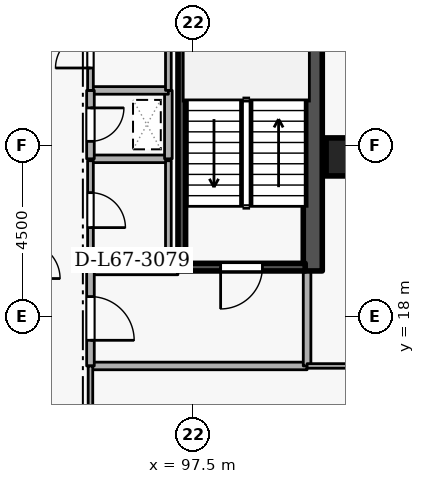
"""IFC4 building model, lengths in metres.
Left out: names, types, materials, properties, quantities, classifications, styles, units other than length and angle.
Written with IfcOpenShell. Run it as: python <this file> out.ifc"""

import sys

from ifc_helpers import new_model, si_unit, direction, frame, frame_2d, origin, origin_2d, place, context, subcontext, project, spatial, rectangle, extrude, element, fill, save


model = new_model("IFC4")
c1 = context("Model", 3, precision=1e-05, world=origin(), true_north=direction((0.0, 1.0)))
c2 = subcontext(c1, "Body", "Model", "MODEL_VIEW")
j1 = project(units=[si_unit("LENGTHUNIT", "METRE"), si_unit("PLANEANGLEUNIT", "RADIAN")], contexts=[c1])
p1 = place(None, origin())
s1 = spatial("IfcSite", under=j1, at=p1, CompositionType="ELEMENT")
p2 = place(p1, origin())
s2 = spatial("IfcBuilding", under=s1, at=p2, CompositionType="ELEMENT")
p3 = place(p2, frame((0.0, 0.0, 251.1)))
s3 = spatial("IfcBuildingStorey", under=s2, at=p3, CompositionType="ELEMENT", Elevation=251.1)
p4 = place(p3, frame((100.65, 19.2, 0.0), z_axis=(0.0, 0.0, 1.0), x_axis=(0.0, 1.0, 0.0)))
e1 = element("IfcWall", 1, at=p4, inside=s3, PredefinedType="SHEAR", context=c2, shape_type="SweptSolid", body=[
    extrude(rectangle(XDim=15.6, YDim=0.5, at=frame_2d((7.8, 0.0))), origin(), (0.0, 0.0, 1.0), 3.6),
])
p5 = place(p3, frame((101.5, 22.2, 0.0), z_axis=(0.0, 0.0, 1.0), x_axis=(1.0, 0.0, 0.0)))
e2 = element("IfcColumn", 2, at=p5, inside=s3, PredefinedType="COLUMN", context=c2, shape_type="SweptSolid", body=[
    extrude(rectangle(XDim=1.0, YDim=1.0, at=origin_2d()), origin(), (0.0, 0.0, 1.0), 3.6),
])
p6 = place(p3, frame((100.45, 19.3, 0.0), z_axis=(0.0, 0.0, 1.0), x_axis=(-1.0, 0.0, 0.0)))
e3 = element("IfcWall", 3, at=p6, inside=s3, PredefinedType="SHEAR", context=c2, shape_type="SweptSolid", body=[
    extrude(rectangle(XDim=3.35, YDim=0.2, at=frame_2d((1.675, 0.0))), origin(), (0.0, 0.0, 1.0), 3.6),
])
p7 = place(p6, frame((1.125, 0.0, 0.0)))
e4 = element("IfcOpeningElement", 4, at=p7, cuts=e3, PredefinedType="OPENING", context=c2, shape_type="SweptSolid", body=[
    extrude(rectangle(XDim=1.1, YDim=2.1, at=frame_2d((0.55, 1.05))), frame((0.0, 0.11, 0.0), z_axis=(0.0, -1.0, 0.0), x_axis=(1.0, 0.0, 0.0)), (0.0, 0.0, 1.0), 0.22),
])
p8 = place(p3, frame((97.203, 26.55, 0.0), z_axis=(0.0, 0.0, 1.0), x_axis=(0.0, -1.0, 0.0)))
e5 = element("IfcWall", 5, at=p8, inside=s3, PredefinedType="SHEAR", context=c2, shape_type="SweptSolid", body=[
    extrude(rectangle(XDim=7.1, YDim=0.2, at=frame_2d((3.55, 0.0))), origin(), (0.0, 0.0, 1.0), 3.6),
])
p9 = place(p3, frame((94.8, 16.7, 0.0), z_axis=(0.0, 0.0, 1.0), x_axis=(1.0, 0.0, 0.0)))
e6 = element("IfcWall", 6, at=p9, inside=s3, PredefinedType="STANDARD", context=c2, shape_type="SweptSolid", body=[
    extrude(rectangle(XDim=5.7, YDim=0.2, at=frame_2d((2.85, 0.0))), origin(), (0.0, 0.0, 1.0), 3.32),
])
p10 = place(p3, frame((100.5, 16.7, 0.0), z_axis=(0.0, 0.0, 1.0), x_axis=(0.0, 1.0, 0.0)))
e7 = element("IfcWall", 7, at=p10, inside=s3, PredefinedType="STANDARD", context=c2, shape_type="SweptSolid", body=[
    extrude(rectangle(XDim=2.5, YDim=0.2, at=frame_2d((1.25, 0.0))), origin(), (0.0, 0.0, 1.0), 3.32),
])
p11 = place(p3, frame((97.1, 19.2, 0.0), z_axis=(0.0, 0.0, 1.0), x_axis=(-1.0, 0.0, 0.0)))
e8 = element("IfcWall", 8, at=p11, inside=s3, PredefinedType="STANDARD", context=c2, shape_type="SweptSolid", body=[
    extrude(rectangle(XDim=2.3, YDim=0.2, at=frame_2d((1.15, 0.0))), origin(), (0.0, 0.0, 1.0), 2.525),
])
p12 = place(p3, frame((94.8, 19.2, 0.0), z_axis=(0.0, 0.0, 1.0), x_axis=(0.0, -1.0, 0.0)))
e9 = element("IfcWall", 9, at=p12, inside=s3, PredefinedType="STANDARD", context=c2, shape_type="SweptSolid", body=[
    extrude(rectangle(XDim=2.5, YDim=0.2, at=frame_2d((1.25, 0.0))), origin(), (0.0, 0.0, 1.0), 3.32),
])
p13 = place(p12, frame((0.675, 0.0, 0.0)))
e10 = element("IfcOpeningElement", 10, at=p13, cuts=e9, PredefinedType="OPENING", context=c2, shape_type="SweptSolid", body=[
    extrude(rectangle(XDim=1.15, YDim=2.1, at=frame_2d((0.575, 1.05))), frame((0.0, 0.11, 0.0), z_axis=(0.0, -1.0, 0.0), x_axis=(1.0, 0.0, 0.0)), (0.0, 0.0, 1.0), 0.22),
])
p14 = place(p3, frame((94.8, 22.15, 0.0), z_axis=(0.0, 0.0, 1.0), x_axis=(1.0, 0.0, 0.0)))
e11 = element("IfcWall", 11, at=p14, inside=s3, PredefinedType="STANDARD", context=c2, shape_type="SweptSolid", body=[
    extrude(rectangle(XDim=2.05, YDim=0.2, at=frame_2d((1.025, 0.0))), origin(), (0.0, 0.0, 1.0), 3.32),
])
p15 = place(p3, frame((96.85, 22.15, 0.0), z_axis=(0.0, 0.0, 1.0), x_axis=(0.0, 1.0, 0.0)))
e12 = element("IfcWall", 12, at=p15, inside=s3, PredefinedType="STANDARD", context=c2, shape_type="SweptSolid", body=[
    extrude(rectangle(XDim=1.8, YDim=0.2, at=frame_2d((0.9, 0.0))), origin(), (0.0, 0.0, 1.0), 3.32),
])
p16 = place(p3, frame((96.85, 23.95, 0.0), z_axis=(0.0, 0.0, 1.0), x_axis=(-1.0, 0.0, 0.0)))
e13 = element("IfcWall", 13, at=p16, inside=s3, PredefinedType="STANDARD", context=c2, shape_type="SweptSolid", body=[
    extrude(rectangle(XDim=2.05, YDim=0.2, at=frame_2d((1.025, 0.0))), origin(), (0.0, 0.0, 1.0), 3.32),
])
p17 = place(p3, frame((94.8, 23.95, 0.0), z_axis=(0.0, 0.0, 1.0), x_axis=(0.0, -1.0, 0.0)))
e14 = element("IfcWall", 14, at=p17, inside=s3, PredefinedType="STANDARD", context=c2, shape_type="SweptSolid", body=[
    extrude(rectangle(XDim=1.8, YDim=0.2, at=frame_2d((0.9, 0.0))), origin(), (0.0, 0.0, 1.0), 3.32),
])
p18 = place(p17, frame((0.46, 0.0, 0.0)))
e15 = element("IfcOpeningElement", 15, at=p18, cuts=e14, PredefinedType="OPENING", context=c2, shape_type="SweptSolid", body=[
    extrude(rectangle(XDim=0.88, YDim=2.04, at=frame_2d((0.44, 1.02))), frame((0.0, 0.11, 0.0), z_axis=(0.0, -1.0, 0.0), x_axis=(1.0, 0.0, 0.0)), (0.0, 0.0, 1.0), 0.22),
])
p19 = place(p3, frame((94.8, 19.5, 0.0), z_axis=(0.0, 0.0, 1.0), x_axis=(1.0, 0.0, 0.0)))
e16 = element("IfcWall", 16, at=p19, inside=s3, PredefinedType="PARTITIONING", context=c2, shape_type="SweptSolid", body=[
    extrude(rectangle(XDim=2.05, YDim=0.15, at=frame_2d((1.025, 0.0))), origin(), (0.0, 0.0, 1.0), 2.525),
])
p20 = place(p3, frame((96.85, 19.5, 0.0), z_axis=(0.0, 0.0, 1.0), x_axis=(0.0, 1.0, 0.0)))
e17 = element("IfcWall", 17, at=p20, inside=s3, PredefinedType="PARTITIONING", context=c2, shape_type="SweptSolid", body=[
    extrude(rectangle(XDim=2.6, YDim=0.15, at=frame_2d((1.3, 0.0))), origin(), (0.0, 0.0, 1.0), 3.32),
])
p21 = place(p3, frame((94.8, 22.1, 0.0), z_axis=(0.0, 0.0, 1.0), x_axis=(0.0, -1.0, 0.0)))
e18 = element("IfcWall", 18, at=p21, inside=s3, PredefinedType="PARTITIONING", context=c2, shape_type="SweptSolid", body=[
    extrude(rectangle(XDim=2.6, YDim=0.15, at=frame_2d((1.3, 0.0))), origin(), (0.0, 0.0, 1.0), 3.32),
])
p22 = place(p21, frame((0.84, 0.0, 0.0)))
e19 = element("IfcOpeningElement", 19, at=p22, cuts=e18, PredefinedType="OPENING", context=c2, shape_type="SweptSolid", body=[
    extrude(rectangle(XDim=0.92, YDim=2.08, at=frame_2d((0.46, 1.04))), frame((0.0, 0.085, 0.0), z_axis=(0.0, -1.0, 0.0), x_axis=(1.0, 0.0, 0.0)), (0.0, 0.0, 1.0), 0.17),
])
p23 = place(p3, frame((94.8, 23.95, 0.0), z_axis=(0.0, 0.0, 1.0), x_axis=(0.0, 1.0, 0.0)))
e20 = element("IfcWall", 20, at=p23, inside=s3, PredefinedType="PARTITIONING", context=c2, shape_type="SweptSolid", body=[
    extrude(rectangle(XDim=2.1, YDim=0.15, at=frame_2d((1.05, 0.0))), origin(), (0.0, 0.0, 1.0), 3.32),
])
p24 = place(p23, frame((0.59, 0.0, 0.0)))
e21 = element("IfcOpeningElement", 21, at=p24, cuts=e20, PredefinedType="OPENING", context=c2, shape_type="SweptSolid", body=[
    extrude(rectangle(XDim=0.92, YDim=2.08, at=frame_2d((0.46, 1.04))), frame((0.0, 0.085, 0.0), z_axis=(0.0, -1.0, 0.0), x_axis=(1.0, 0.0, 0.0)), (0.0, 0.0, 1.0), 0.17),
])
p25 = place(p3, frame((96.85, 26.05, 0.0), z_axis=(0.0, 0.0, 1.0), x_axis=(0.0, -1.0, 0.0)))
e22 = element("IfcWall", 22, at=p25, inside=s3, PredefinedType="PARTITIONING", context=c2, shape_type="SweptSolid", body=[
    extrude(rectangle(XDim=2.1, YDim=0.15, at=frame_2d((1.05, 0.0))), origin(), (0.0, 0.0, 1.0), 3.32),
])
p26 = place(p3, frame((94.8, 14.75, 0.0), z_axis=(0.0, 0.0, 1.0), x_axis=(0.0, 1.0, 0.0)))
e23 = element("IfcWall", 23, at=p26, inside=s3, PredefinedType="PARTITIONING", context=c2, shape_type="SweptSolid", body=[
    extrude(rectangle(XDim=1.95, YDim=0.12, at=frame_2d((0.975, 0.0))), origin(), (0.0, 0.0, 1.0), 3.32),
])
p27 = place(p3, frame((100.5, 16.7, 0.0), z_axis=(0.0, 0.0, 1.0), x_axis=(1.0, 0.0, 0.0)))
e24 = element("IfcWall", 24, at=p27, inside=s3, PredefinedType="PARTITIONING", context=c2, shape_type="SweptSolid", body=[
    extrude(rectangle(XDim=11.72, YDim=0.12, at=frame_2d((5.86, 0.0))), origin(), (0.0, 0.0, 1.0), 3.32),
])
p28 = place(p7, origin())
e25 = element("IfcDoor", 25, at=p28, inside=s3, OperationType="SINGLE_SWING_RIGHT", PredefinedType="DOOR", context=c2, shape_type="SweptSolid", body=[
    extrude(rectangle(XDim=1.1, YDim=2.1, at=frame_2d((0.55, 1.05))), frame((0.0, 0.025, 0.0), z_axis=(0.0, -1.0, 0.0), x_axis=(1.0, 0.0, 0.0)), (0.0, 0.0, 1.0), 0.05),
])
fill(e4, e25)
p29 = place(p13, origin())
e26 = element("IfcDoor", 26, at=p29, inside=s3, OperationType="SINGLE_SWING_RIGHT", PredefinedType="DOOR", context=c2, shape_type="SweptSolid", body=[
    extrude(rectangle(XDim=1.15, YDim=2.1, at=frame_2d((0.575, 1.05))), frame((0.0, 0.025, 0.0), z_axis=(0.0, -1.0, 0.0), x_axis=(1.0, 0.0, 0.0)), (0.0, 0.0, 1.0), 0.05),
])
fill(e10, e26)
p30 = place(p18, origin())
e27 = element("IfcDoor", 27, at=p30, inside=s3, OperationType="SINGLE_SWING_LEFT", PredefinedType="DOOR", context=c2, shape_type="SweptSolid", body=[
    extrude(rectangle(XDim=0.88, YDim=2.04, at=frame_2d((0.44, 1.02))), frame((0.0, 0.025, 0.0), z_axis=(0.0, -1.0, 0.0), x_axis=(1.0, 0.0, 0.0)), (0.0, 0.0, 1.0), 0.05),
])
fill(e15, e27)
p31 = place(p22, origin())
e28 = element("IfcDoor", 28, at=p31, inside=s3, OperationType="SINGLE_SWING_RIGHT", PredefinedType="DOOR", context=c2, shape_type="SweptSolid", body=[
    extrude(rectangle(XDim=0.92, YDim=2.08, at=frame_2d((0.46, 1.04))), frame((0.0, 0.025, 0.0), z_axis=(0.0, -1.0, 0.0), x_axis=(1.0, 0.0, 0.0)), (0.0, 0.0, 1.0), 0.05),
])
fill(e19, e28)
p32 = place(p24, origin())
e29 = element("IfcDoor", 29, at=p32, inside=s3, OperationType="SINGLE_SWING_LEFT", PredefinedType="DOOR", context=c2, shape_type="SweptSolid", body=[
    extrude(rectangle(XDim=0.92, YDim=2.08, at=frame_2d((0.46, 1.04))), frame((0.0, 0.025, 0.0), z_axis=(0.0, -1.0, 0.0), x_axis=(1.0, 0.0, 0.0)), (0.0, 0.0, 1.0), 0.05),
])
fill(e21, e29)
save(model, sys.argv[1])
